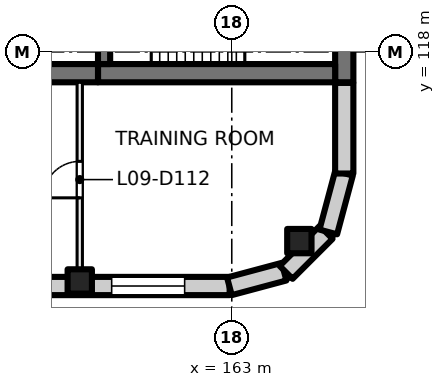
"""IFC4 building model, lengths in metres.
Left out: names, types, materials, properties, quantities, classifications, styles, units other than length and angle.
Written with IfcOpenShell. Run it as: python <this file> out.ifc"""

import sys

from ifc_helpers import new_model, si_unit, direction, frame, frame_2d, origin, origin_2d, place, context, subcontext, project, spatial, rectangle, extrude, element, fill, save


model = new_model("IFC4")
c1 = context("Model", 3, precision=1e-05, world=origin(), true_north=direction((0.0, 1.0)))
c2 = subcontext(c1, "Body", "Model", "MODEL_VIEW")
j1 = project(units=[si_unit("LENGTHUNIT", "METRE"), si_unit("PLANEANGLEUNIT", "RADIAN")], contexts=[c1])
p1 = place(None, origin())
s1 = spatial("IfcSite", under=j1, at=p1, CompositionType="ELEMENT")
p2 = place(p1, origin())
s2 = spatial("IfcBuilding", under=s1, at=p2, CompositionType="ELEMENT")
p3 = place(p2, frame((0.0, 0.0, 43.5)))
s3 = spatial("IfcBuildingStorey", under=s2, at=p3, CompositionType="ELEMENT", Elevation=43.5)
for number, where, z_axis, x_axis in (
    (1, (165.223, 111.777, 0.0), (0.0, 0.0, 1.0), (1.0, 0.0, 0.0)),
    (2, (158.0, 110.45, 0.0), (0.0, 0.0, 1.0), (1.0, 0.0, 0.0)),
):
    element("IfcColumn", number, at=place(p3, frame(where, z_axis=z_axis, x_axis=x_axis)), inside=s3, PredefinedType="COLUMN", context=c2, shape_type="SweptSolid", body=[
        extrude(rectangle(XDim=0.8, YDim=0.8, at=origin_2d()), origin(), (0.0, 0.0, 1.0), 4.0),
    ])
p4 = place(p3, frame((166.7, 120.8, 0.0), z_axis=(0.0, 0.0, 1.0), x_axis=(0.0, -1.0, 0.0)))
e3 = element("IfcWall", 3, at=p4, inside=s3, PredefinedType="SHEAR", context=c2, shape_type="SweptSolid", body=[
    extrude(rectangle(XDim=3.8, YDim=0.6, at=frame_2d((1.9, 0.0))), origin(), (0.0, 0.0, 1.0), 4.0),
])
p5 = place(p3, frame((166.4, 117.3, 0.0), z_axis=(0.0, 0.0, 1.0), x_axis=(-1.0, 0.0, 0.0)))
e4 = element("IfcWall", 4, at=p5, inside=s3, PredefinedType="SHEAR", context=c2, shape_type="SweptSolid", body=[
    extrude(rectangle(XDim=7.8, YDim=0.6, at=frame_2d((3.9, 0.0))), origin(), (0.0, 0.0, 1.0), 4.0),
])
p6 = place(p3, frame((158.6, 117.3, 0.0), z_axis=(0.0, 0.0, 1.0), x_axis=(-1.0, 0.0, 0.0)))
e5 = element("IfcWall", 5, at=p6, inside=s3, PredefinedType="SHEAR", context=c2, shape_type="SweptSolid", body=[
    extrude(rectangle(XDim=4.6, YDim=0.6, at=frame_2d((2.3, 0.0))), origin(), (0.0, 0.0, 1.0), 4.0),
])
p7 = place(p3, frame((158.8, 120.4, 0.0), z_axis=(0.0, 0.0, 1.0), x_axis=(0.0, -1.0, 0.0)))
e6 = element("IfcWall", 6, at=p7, inside=s3, PredefinedType="SHEAR", context=c2, shape_type="SweptSolid", body=[
    extrude(rectangle(XDim=2.8, YDim=0.4, at=frame_2d((1.4, 0.0))), origin(), (0.0, 0.0, 1.0), 4.0),
])
p8 = place(p7, frame((0.9, 0.0, 0.0)))
e7 = element("IfcOpeningElement", 7, at=p8, cuts=e6, PredefinedType="OPENING", context=c2, shape_type="SweptSolid", body=[
    extrude(rectangle(XDim=1.0, YDim=2.1, at=frame_2d((0.5, 1.05))), frame((0.0, 0.21, 0.0), z_axis=(0.0, -1.0, 0.0), x_axis=(1.0, 0.0, 0.0)), (0.0, 0.0, 1.0), 0.42),
])
p9 = place(p3, frame((162.93, 110.3, 0.0), z_axis=(0.0, 0.0, 1.0), x_axis=(-1.0, 0.0, 0.0)))
e8 = element("IfcWall", 8, at=p9, inside=s3, PredefinedType="SOLIDWALL", context=c2, shape_type="SweptSolid", body=[
    extrude(rectangle(XDim=31.93, YDim=0.6, at=frame_2d((15.965, 0.0))), origin(), (0.0, 0.0, 1.0), 3.625),
])
p10 = place(p9, frame((1.48, 0.0, 0.9)))
e9 = element("IfcOpeningElement", 9, at=p10, cuts=e8, PredefinedType="OPENING", context=c2, shape_type="SweptSolid", body=[
    extrude(rectangle(XDim=2.4, YDim=2.4, at=frame_2d((1.2, 1.2))), frame((0.0, 0.31, 0.0), z_axis=(0.0, -1.0, 0.0), x_axis=(1.0, 0.0, 0.0)), (0.0, 0.0, 1.0), 0.62),
])
p11 = place(p9, frame((5.98, 0.0, 0.9)))
e10 = element("IfcOpeningElement", 10, at=p11, cuts=e8, PredefinedType="OPENING", context=c2, shape_type="SweptSolid", body=[
    extrude(rectangle(XDim=2.4, YDim=2.4, at=frame_2d((1.2, 1.2))), frame((0.0, 0.31, 0.0), z_axis=(0.0, -1.0, 0.0), x_axis=(1.0, 0.0, 0.0)), (0.0, 0.0, 1.0), 0.62),
])
p12 = place(p9, frame((10.48, 0.0, 0.9)))
e11 = element("IfcOpeningElement", 11, at=p12, cuts=e8, PredefinedType="OPENING", context=c2, shape_type="SweptSolid", body=[
    extrude(rectangle(XDim=2.4, YDim=2.4, at=frame_2d((1.2, 1.2))), frame((0.0, 0.31, 0.0), z_axis=(0.0, -1.0, 0.0), x_axis=(1.0, 0.0, 0.0)), (0.0, 0.0, 1.0), 0.62),
])
p13 = place(p9, frame((14.98, 0.0, 0.9)))
e12 = element("IfcOpeningElement", 12, at=p13, cuts=e8, PredefinedType="OPENING", context=c2, shape_type="SweptSolid", body=[
    extrude(rectangle(XDim=2.4, YDim=2.4, at=frame_2d((1.2, 1.2))), frame((0.0, 0.31, 0.0), z_axis=(0.0, -1.0, 0.0), x_axis=(1.0, 0.0, 0.0)), (0.0, 0.0, 1.0), 0.62),
])
p14 = place(p9, frame((19.48, 0.0, 0.9)))
e13 = element("IfcOpeningElement", 13, at=p14, cuts=e8, PredefinedType="OPENING", context=c2, shape_type="SweptSolid", body=[
    extrude(rectangle(XDim=2.4, YDim=2.4, at=frame_2d((1.2, 1.2))), frame((0.0, 0.31, 0.0), z_axis=(0.0, -1.0, 0.0), x_axis=(1.0, 0.0, 0.0)), (0.0, 0.0, 1.0), 0.62),
])
p15 = place(p9, frame((23.98, 0.0, 0.9)))
e14 = element("IfcOpeningElement", 14, at=p15, cuts=e8, PredefinedType="OPENING", context=c2, shape_type="SweptSolid", body=[
    extrude(rectangle(XDim=2.4, YDim=2.4, at=frame_2d((1.2, 1.2))), frame((0.0, 0.31, 0.0), z_axis=(0.0, -1.0, 0.0), x_axis=(1.0, 0.0, 0.0)), (0.0, 0.0, 1.0), 0.62),
])
p16 = place(p9, frame((28.48, 0.0, 0.9)))
e15 = element("IfcOpeningElement", 15, at=p16, cuts=e8, PredefinedType="OPENING", context=c2, shape_type="SweptSolid", body=[
    extrude(rectangle(XDim=2.4, YDim=2.4, at=frame_2d((1.2, 1.2))), frame((0.0, 0.31, 0.0), z_axis=(0.0, -1.0, 0.0), x_axis=(1.0, 0.0, 0.0)), (0.0, 0.0, 1.0), 0.62),
])
for number, where, z_axis, x_axis in (
    (16, (164.719, 110.771, 0.0), (0.0, 0.0, 1.0), (-0.966, -0.259, 0.0)),
    (17, (166.104, 112.064, 0.0), (0.0, 0.0, 1.0), (-0.707, -0.707, 0.0)),
):
    element("IfcWall", number, at=place(p3, frame(where, z_axis=z_axis, x_axis=x_axis)), inside=s3, PredefinedType="SOLIDWALL", context=c2, shape_type="SweptSolid", body=[
        extrude(rectangle(XDim=1.861, YDim=0.6, at=frame_2d((0.93, 0.0))), origin(), (0.0, 0.0, 1.0), 3.625),
    ])
p17 = place(p3, frame((166.692, 114.01, 0.0), z_axis=(0.0, 0.0, 1.0), x_axis=(-0.258839784042, -0.965920269068, 0.0)))
e18 = element("IfcWall", 18, at=p17, inside=s3, PredefinedType="SOLIDWALL", context=c2, shape_type="SweptSolid", body=[
    extrude(rectangle(XDim=2.0, YDim=0.6, at=frame_2d((1.0, 0.0))), origin(), (0.0, 0.0, 1.0), 3.625),
])
p18 = place(p3, frame((166.7, 116.98, 0.0), z_axis=(0.0, 0.0, 1.0), x_axis=(0.0, -1.0, 0.0)))
e19 = element("IfcWall", 19, at=p18, inside=s3, PredefinedType="SOLIDWALL", context=c2, shape_type="SweptSolid", body=[
    extrude(rectangle(XDim=2.98, YDim=0.6, at=frame_2d((1.49, 0.0))), origin(), (0.0, 0.0, 1.0), 3.625),
])
p19 = place(p3, frame((158.0, 110.6, 0.0), z_axis=(0.0, 0.0, 1.0), x_axis=(0.0, 1.0, 0.0)))
e20 = element("IfcWall", 20, at=p19, inside=s3, PredefinedType="PARTITIONING", context=c2, shape_type="SweptSolid", body=[
    extrude(rectangle(XDim=6.4, YDim=0.175, at=frame_2d((3.2, 0.0))), origin(), (0.0, 0.0, 1.0), 3.625),
])
p20 = place(p19, frame((2.6, 0.0, 0.0)))
e21 = element("IfcOpeningElement", 21, at=p20, cuts=e20, PredefinedType="OPENING", context=c2, shape_type="SweptSolid", body=[
    extrude(rectangle(XDim=1.2, YDim=2.1, at=frame_2d((0.6, 1.05))), frame((0.0, 0.097, 0.0), z_axis=(0.0, -1.0, 0.0), x_axis=(1.0, 0.0, 0.0)), (0.0, 0.0, 1.0), 0.195),
])
p21 = place(p10, origin())
e22 = element("IfcWindow", 22, at=p21, inside=s3, PartitioningType="SINGLE_PANEL", PredefinedType="WINDOW", context=c2, shape_type="SweptSolid", body=[
    extrude(rectangle(XDim=2.4, YDim=2.4, at=frame_2d((1.2, 1.2))), frame((0.0, 0.03, 0.0), z_axis=(0.0, -1.0, 0.0), x_axis=(1.0, 0.0, 0.0)), (0.0, 0.0, 1.0), 0.06),
])
fill(e9, e22)
p22 = place(p20, origin())
e23 = element("IfcDoor", 23, at=p22, inside=s3, OperationType="DOUBLE_DOOR_SINGLE_SWING", PredefinedType="DOOR", context=c2, shape_type="SweptSolid", body=[
    extrude(rectangle(XDim=1.2, YDim=2.1, at=frame_2d((0.6, 1.05))), frame((0.0, 0.025, 0.0), z_axis=(0.0, -1.0, 0.0), x_axis=(1.0, 0.0, 0.0)), (0.0, 0.0, 1.0), 0.05),
])
fill(e21, e23)
save(model, sys.argv[1])
